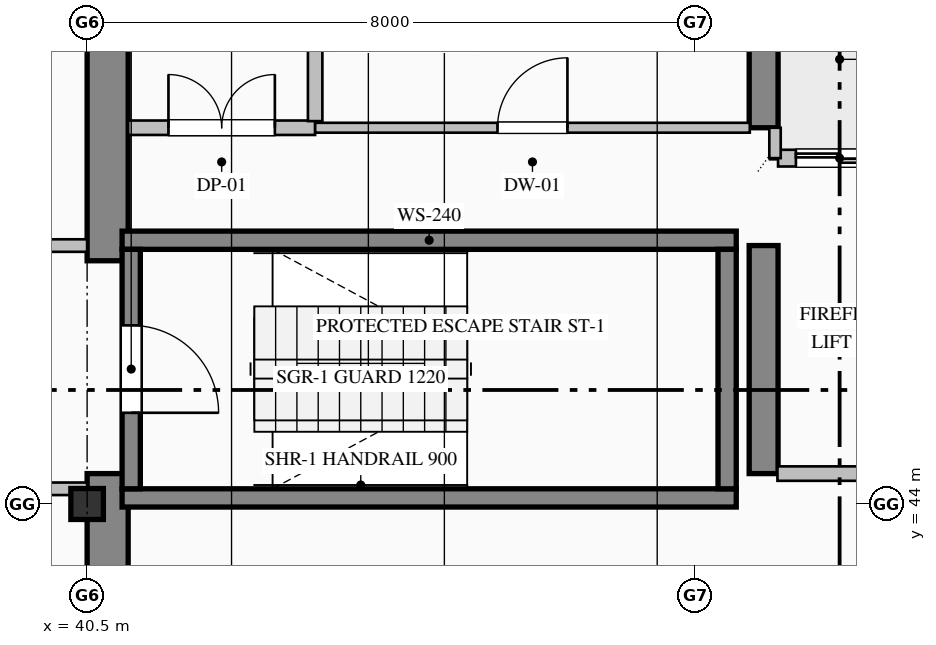
"""IFC4 building model, lengths in metres.
Left out: names, types, materials, properties, quantities, classifications, styles, units other than length and angle.
Written with IfcOpenShell. Run it as: python <this file> out.ifc"""

import sys

from ifc_helpers import new_model, si_unit, direction, frame, frame_2d, origin, origin_2d, place, context, subcontext, project, spatial, rectangle, i_section, extrude, element, fill, save


model = new_model("IFC4")
c1 = context("Model", 3, precision=1e-05, world=origin(), true_north=direction((0.0, 1.0)))
c2 = subcontext(c1, "Body", "Model", "MODEL_VIEW")
j1 = project(units=[si_unit("LENGTHUNIT", "METRE"), si_unit("PLANEANGLEUNIT", "RADIAN")], contexts=[c1])
p1 = place(None, origin())
s1 = spatial("IfcSite", under=j1, at=p1, CompositionType="ELEMENT")
p2 = place(p1, origin())
s2 = spatial("IfcBuilding", under=s1, at=p2, CompositionType="ELEMENT")
p3 = place(p2, frame((0.0, 0.0, 96.2)))
s3 = spatial("IfcBuildingStorey", under=s2, at=p3, CompositionType="ELEMENT", Elevation=96.2)
p4 = place(p3, frame((40.77, 36.54, 0.0), z_axis=(0.0, 0.0, 1.0), x_axis=(0.0, 1.0, 0.0)))
e1 = element("IfcWall", 1, at=p4, inside=s3, PredefinedType="SHEAR", context=c2, shape_type="SweptSolid", body=[
    extrude(rectangle(XDim=7.86, YDim=0.54, at=frame_2d((3.93, 0.0))), origin(), (0.0, 0.0, 1.0), 3.75),
])
p5 = place(p3, frame((40.77, 47.2, 0.0), z_axis=(0.0, 0.0, 1.0), x_axis=(0.0, 1.0, 0.0)))
e2 = element("IfcWall", 2, at=p5, inside=s3, PredefinedType="SHEAR", context=c2, shape_type="SweptSolid", body=[
    extrude(rectangle(XDim=4.26, YDim=0.54, at=frame_2d((2.13, 0.0))), origin(), (0.0, 0.0, 1.0), 3.75),
])
p6 = place(p3, frame((49.4, 44.4, 0.0), z_axis=(0.0, 0.0, 1.0), x_axis=(0.0, 1.0, 0.0)))
e3 = element("IfcWall", 3, at=p6, inside=s3, PredefinedType="SHEAR", context=c2, shape_type="SweptSolid", body=[
    extrude(rectangle(XDim=3.0, YDim=0.38, at=frame_2d((1.5, 0.0))), origin(), (0.0, 0.0, 1.0), 3.75),
])
p7 = place(p3, frame((49.4, 48.95, 0.0), z_axis=(0.0, 0.0, 1.0), x_axis=(0.0, 1.0, 0.0)))
e4 = element("IfcWall", 4, at=p7, inside=s3, PredefinedType="SHEAR", context=c2, shape_type="SweptSolid", body=[
    extrude(rectangle(XDim=2.51, YDim=0.38, at=frame_2d((1.255, 0.0))), origin(), (0.0, 0.0, 1.0), 3.75),
])
p8 = place(p3, frame((40.5, 44.0, 0.0), z_axis=(0.0, 0.0, 1.0), x_axis=(1.0, 0.0, 0.0)))
e5 = element("IfcColumn", 5, at=p8, inside=s3, PredefinedType="COLUMN", context=c2, shape_type="SweptSolid", body=[
    extrude(i_section(OverallWidth=0.407, OverallDepth=0.428, WebThickness=0.02, FlangeThickness=0.035, FilletRadius=0.022, at=origin_2d()), origin(), (0.0, 0.0, 1.0), 4.0),
])
for number, where, z_axis, x_axis in (
    (6, (40.96, 47.47, 0.0), (0.0, 0.0, 1.0), (1.0, 0.0, 0.0)),
    (7, (49.04, 44.08, 0.0), (0.0, 0.0, 1.0), (-1.0, 0.0, 0.0)),
):
    element("IfcWall", number, at=place(p3, frame(where, z_axis=z_axis, x_axis=x_axis)), inside=s3, PredefinedType="SOLIDWALL", context=c2, shape_type="SweptSolid", body=[
        extrude(rectangle(XDim=8.08, YDim=0.24, at=frame_2d((4.04, 0.0))), origin(), (0.0, 0.0, 1.0), 4.0),
    ])
p9 = place(p3, frame((41.08, 47.35, 0.0), z_axis=(0.0, 0.0, 1.0), x_axis=(0.0, -1.0, 0.0)))
e8 = element("IfcWall", 8, at=p9, inside=s3, PredefinedType="SOLIDWALL", context=c2, shape_type="SweptSolid", body=[
    extrude(rectangle(XDim=3.15, YDim=0.24, at=frame_2d((1.575, 0.0))), origin(), (0.0, 0.0, 1.0), 4.0),
])
p10 = place(p9, frame((1.0, 0.0, 0.0)))
e9 = element("IfcOpeningElement", 9, at=p10, cuts=e8, PredefinedType="OPENING", context=c2, shape_type="SweptSolid", body=[
    extrude(rectangle(XDim=1.15, YDim=2.2, at=frame_2d((0.575, 1.1))), frame((0.0, 0.13, 0.0), z_axis=(0.0, -1.0, 0.0), x_axis=(1.0, 0.0, 0.0)), (0.0, 0.0, 1.0), 0.26),
])
p11 = place(p3, frame((48.92, 44.2, 0.0), z_axis=(0.0, 0.0, 1.0), x_axis=(0.0, 1.0, 0.0)))
e10 = element("IfcWall", 10, at=p11, inside=s3, PredefinedType="SOLIDWALL", context=c2, shape_type="SweptSolid", body=[
    extrude(rectangle(XDim=3.15, YDim=0.24, at=frame_2d((1.575, 0.0))), origin(), (0.0, 0.0, 1.0), 4.0),
])
p12 = place(p3, frame((54.71, 48.55, 0.0), z_axis=(0.0, 0.0, 1.0), x_axis=(-1.0, 0.0, 0.0)))
e11 = element("IfcWall", 11, at=p12, inside=s3, PredefinedType="PARTITIONING", context=c2, shape_type="SweptSolid", body=[
    extrude(rectangle(XDim=5.12, YDim=0.22, at=frame_2d((2.56, 0.0))), origin(), (0.0, 0.0, 1.0), 3.75),
])
p13 = place(p12, frame((3.735, 0.0, 0.0)))
e12 = element("IfcOpeningElement", 12, at=p13, cuts=e11, PredefinedType="OPENING", context=c2, shape_type="SweptSolid", body=[
    extrude(rectangle(XDim=1.15, YDim=2.2, at=frame_2d((0.575, 1.1))), frame((0.0, 0.12, 0.0), z_axis=(0.0, -1.0, 0.0), x_axis=(1.0, 0.0, 0.0)), (0.0, 0.0, 1.0), 0.24),
])
p14 = place(p12, frame((0.935, 0.0, 0.0)))
e13 = element("IfcOpeningElement", 13, at=p14, cuts=e11, PredefinedType="OPENING", context=c2, shape_type="SweptSolid", body=[
    extrude(rectangle(XDim=1.15, YDim=2.2, at=frame_2d((0.575, 1.1))), frame((0.0, 0.12, 0.0), z_axis=(0.0, -1.0, 0.0), x_axis=(1.0, 0.0, 0.0)), (0.0, 0.0, 1.0), 0.24),
])
p15 = place(p3, frame((49.55, 48.55, 0.0), z_axis=(0.0, 0.0, 1.0), x_axis=(0.0, 1.0, 0.0)))
e14 = element("IfcWall", 14, at=p15, inside=s3, PredefinedType="PARTITIONING", context=c2, shape_type="SweptSolid", body=[
    extrude(rectangle(XDim=0.4, YDim=0.15, at=frame_2d((0.2, 0.0))), origin(), (0.0, 0.0, 1.0), 3.75),
])
p16 = place(p3, frame((37.8, 47.4, 0.0), z_axis=(0.0, 0.0, 1.0), x_axis=(1.0, 0.0, 0.0)))
e15 = element("IfcWall", 15, at=p16, inside=s3, PredefinedType="PARTITIONING", context=c2, shape_type="SweptSolid", body=[
    extrude(rectangle(XDim=2.7, YDim=0.165, at=frame_2d((1.35, 0.0))), origin(), (0.0, 0.0, 1.0), 3.75),
])
p17 = place(p16, frame((0.825, 0.0, 0.0)))
e16 = element("IfcOpeningElement", 16, at=p17, cuts=e15, PredefinedType="OPENING", context=c2, shape_type="SweptSolid", body=[
    extrude(rectangle(XDim=1.05, YDim=2.15, at=frame_2d((0.525, 1.075))), frame((0.0, 0.093, 0.0), z_axis=(0.0, -1.0, 0.0), x_axis=(1.0, 0.0, 0.0)), (0.0, 0.0, 1.0), 0.185),
])
p18 = place(p3, frame((40.5, 44.2, 0.0), z_axis=(0.0, 0.0, 1.0), x_axis=(-1.0, 0.0, 0.0)))
e17 = element("IfcWall", 17, at=p18, inside=s3, PredefinedType="PARTITIONING", context=c2, shape_type="SweptSolid", body=[
    extrude(rectangle(XDim=2.7, YDim=0.165, at=frame_2d((1.35, 0.0))), origin(), (0.0, 0.0, 1.0), 3.75),
])
p19 = place(p18, frame((0.825, 0.0, 0.0)))
e18 = element("IfcOpeningElement", 18, at=p19, cuts=e17, PredefinedType="OPENING", context=c2, shape_type="SweptSolid", body=[
    extrude(rectangle(XDim=1.05, YDim=2.15, at=frame_2d((0.525, 1.075))), frame((0.0, 0.093, 0.0), z_axis=(0.0, -1.0, 0.0), x_axis=(1.0, 0.0, 0.0)), (0.0, 0.0, 1.0), 0.185),
])
p20 = place(p3, frame((41.04, 48.95, 0.0), z_axis=(0.0, 0.0, 1.0), x_axis=(1.0, 0.0, 0.0)))
e19 = element("IfcWall", 19, at=p20, inside=s3, PredefinedType="PARTITIONING", context=c2, shape_type="SweptSolid", body=[
    extrude(rectangle(XDim=2.46, YDim=0.19, at=frame_2d((1.23, 0.0))), origin(), (0.0, 0.0, 1.0), 3.75),
])
p21 = place(p20, frame((0.53, 0.0, 0.0)))
e20 = element("IfcOpeningElement", 20, at=p21, cuts=e19, PredefinedType="OPENING", context=c2, shape_type="SweptSolid", body=[
    extrude(rectangle(XDim=1.4, YDim=2.25, at=frame_2d((0.7, 1.125))), frame((0.0, 0.105, 0.0), z_axis=(0.0, -1.0, 0.0), x_axis=(1.0, 0.0, 0.0)), (0.0, 0.0, 1.0), 0.21),
])
p22 = place(p3, frame((43.5, 48.95, 0.0), z_axis=(0.0, 0.0, 1.0), x_axis=(1.0, 0.0, 0.0)))
e21 = element("IfcWall", 21, at=p22, inside=s3, PredefinedType="PARTITIONING", context=c2, shape_type="SweptSolid", body=[
    extrude(rectangle(XDim=5.718, YDim=0.13, at=frame_2d((2.859, 0.0))), origin(), (0.0, 0.0, 1.0), 3.75),
])
p23 = place(p22, frame((2.399, 0.0, 0.0)))
e22 = element("IfcOpeningElement", 22, at=p23, cuts=e21, PredefinedType="OPENING", context=c2, shape_type="SweptSolid", body=[
    extrude(rectangle(XDim=0.92, YDim=2.15, at=frame_2d((0.46, 1.075))), frame((0.0, 0.075, 0.0), z_axis=(0.0, -1.0, 0.0), x_axis=(1.0, 0.0, 0.0)), (0.0, 0.0, 1.0), 0.15),
])
p24 = place(p3, frame((54.718, 44.4, 0.0), z_axis=(0.0, 0.0, 1.0), x_axis=(-1.0, 0.0, 0.0)))
e23 = element("IfcWall", 23, at=p24, inside=s3, PredefinedType="PARTITIONING", context=c2, shape_type="SweptSolid", body=[
    extrude(rectangle(XDim=5.136, YDim=0.19, at=frame_2d((2.568, 0.0))), origin(), (0.0, 0.0, 1.0), 3.75),
])
p25 = place(p24, frame((2.043, 0.0, 0.0)))
e24 = element("IfcOpeningElement", 24, at=p25, cuts=e23, PredefinedType="OPENING", context=c2, shape_type="SweptSolid", body=[
    extrude(rectangle(XDim=1.05, YDim=2.15, at=frame_2d((0.525, 1.075))), frame((0.0, 0.105, 0.0), z_axis=(0.0, -1.0, 0.0), x_axis=(1.0, 0.0, 0.0)), (0.0, 0.0, 1.0), 0.21),
])
p26 = place(p3, frame((43.5, 51.46, 0.0), z_axis=(0.0, 0.0, 1.0), x_axis=(0.0, -1.0, 0.0)))
e25 = element("IfcWall", 25, at=p26, inside=s3, PredefinedType="PARTITIONING", context=c2, shape_type="SweptSolid", body=[
    extrude(rectangle(XDim=2.423, YDim=0.19, at=frame_2d((1.211, 0.0))), origin(), (0.0, 0.0, 1.0), 3.75),
])
p27 = place(p10, origin())
e26 = element("IfcDoor", 26, at=p27, inside=s3, OperationType="SINGLE_SWING_RIGHT", PredefinedType="DOOR", context=c2, shape_type="SweptSolid", body=[
    extrude(rectangle(XDim=1.15, YDim=2.2, at=frame_2d((0.575, 1.1))), frame((0.0, 0.025, 0.0), z_axis=(0.0, -1.0, 0.0), x_axis=(1.0, 0.0, 0.0)), (0.0, 0.0, 1.0), 0.05),
])
fill(e9, e26)
p28 = place(p13, origin())
e27 = element("IfcDoor", 27, at=p28, inside=s3, OperationType="DOUBLE_DOOR_SLIDING", PredefinedType="DOOR", context=c2, shape_type="SweptSolid", body=[
    extrude(rectangle(XDim=1.15, YDim=2.2, at=frame_2d((0.575, 1.1))), frame((0.0, 0.025, 0.0), z_axis=(0.0, -1.0, 0.0), x_axis=(1.0, 0.0, 0.0)), (0.0, 0.0, 1.0), 0.05),
])
fill(e12, e27)
p29 = place(p21, origin())
e28 = element("IfcDoor", 28, at=p29, inside=s3, OperationType="DOUBLE_DOOR_SINGLE_SWING", PredefinedType="DOOR", context=c2, shape_type="SweptSolid", body=[
    extrude(rectangle(XDim=1.4, YDim=2.25, at=frame_2d((0.7, 1.125))), frame((0.0, 0.025, 0.0), z_axis=(0.0, -1.0, 0.0), x_axis=(1.0, 0.0, 0.0)), (0.0, 0.0, 1.0), 0.05),
])
fill(e20, e28)
p30 = place(p23, origin())
e29 = element("IfcDoor", 29, at=p30, inside=s3, OperationType="SINGLE_SWING_RIGHT", PredefinedType="DOOR", context=c2, shape_type="SweptSolid", body=[
    extrude(rectangle(XDim=0.92, YDim=2.15, at=frame_2d((0.46, 1.075))), frame((0.0, 0.025, 0.0), z_axis=(0.0, -1.0, 0.0), x_axis=(1.0, 0.0, 0.0)), (0.0, 0.0, 1.0), 0.05),
])
fill(e22, e29)
save(model, sys.argv[1])
